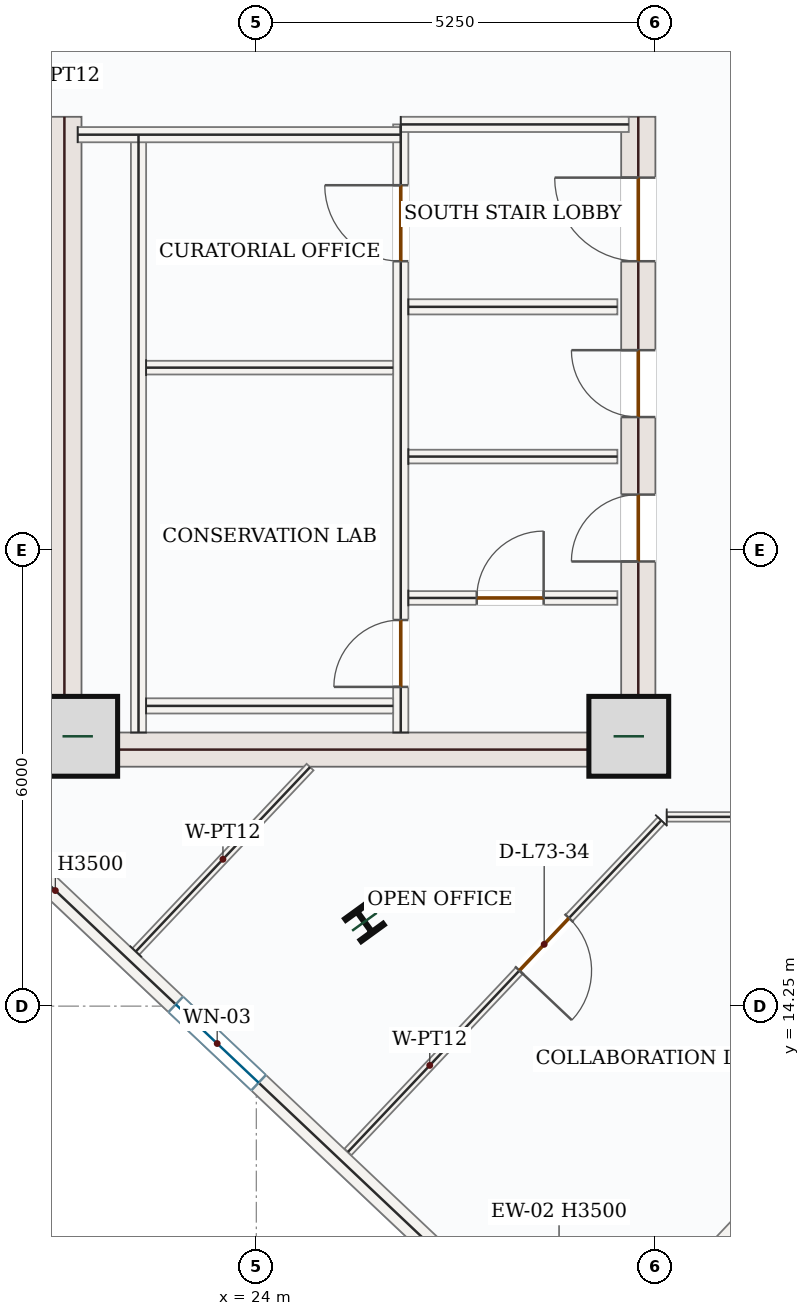
"""IFC4 building model, lengths in metres.
Left out: names, types, materials, properties, quantities, classifications, styles, units other than length and angle.
Written with IfcOpenShell. Run it as: python <this file> out.ifc"""

import sys

from ifc_helpers import new_model, si_unit, direction, frame, frame_2d, origin, origin_2d, place, context, subcontext, project, spatial, rectangle, i_section, extrude, source, transform, mapped, element, fill, save


model = new_model("IFC4")
c1 = context("Model", 3, precision=1e-05, world=origin(), true_north=direction((0.0, 1.0)))
c2 = subcontext(c1, "Body", "Model", "MODEL_VIEW")
j1 = project(units=[si_unit("LENGTHUNIT", "METRE"), si_unit("PLANEANGLEUNIT", "RADIAN")], contexts=[c1])
p1 = place(None, origin())
s1 = spatial("IfcSite", under=j1, at=p1, CompositionType="ELEMENT")
p2 = place(p1, origin())
s2 = spatial("IfcBuilding", under=s1, at=p2, CompositionType="ELEMENT")
p3 = place(p2, frame((0.0, 0.0, 302.85)))
s3 = spatial("IfcBuildingStorey", under=s2, at=p3, CompositionType="ELEMENT", Elevation=302.85)
m1 = source(origin(), c2, "Body", "SweptSolid", [
    extrude(rectangle(XDim=8.55, YDim=0.45, at=frame_2d((4.275, 0.0))), origin(), (0.0, 0.0, 1.0), 3.5),
])
p4 = place(p3, frame((21.475, 17.4, 0.0), z_axis=(0.0, 0.0, 1.0), x_axis=(0.0, 1.0, 0.0)))
e1 = element("IfcWall", 1, at=p4, inside=s3, PredefinedType="SHEAR", context=c2, shape_type="MappedRepresentation", body=[
    mapped(m1, transform((0.0, 0.0, 0.0), x_axis=(1.0, 0.0, 0.0), y_axis=(0.0, 1.0, 0.0), z_axis=(0.0, 0.0, 1.0), scale=1.0)),
])
p5 = place(p3, frame((29.025, 17.4, 0.0), z_axis=(0.0, 0.0, 1.0), x_axis=(0.0, 1.0, 0.0)))
e2 = element("IfcWall", 2, at=p5, inside=s3, PredefinedType="SHEAR", context=c2, shape_type="SweptSolid", body=[
    extrude(rectangle(XDim=8.55, YDim=0.45, at=frame_2d((4.275, 0.0))), origin(), (0.0, 0.0, 1.0), 3.5),
])
p6 = place(p5, frame((6.65, 0.0, 0.0)))
e3 = element("IfcOpeningElement", 3, at=p6, cuts=e2, PredefinedType="OPENING", context=c2, shape_type="SweptSolid", body=[
    extrude(rectangle(XDim=1.1, YDim=2.2, at=frame_2d((0.55, 1.1))), frame((0.0, 0.235, 0.0), z_axis=(0.0, -1.0, 0.0), x_axis=(1.0, 0.0, 0.0)), (0.0, 0.0, 1.0), 0.47),
])
p7 = place(p5, frame((2.7, 0.0, 0.0)))
e4 = element("IfcOpeningElement", 4, at=p7, cuts=e2, PredefinedType="OPENING", context=c2, shape_type="SweptSolid", body=[
    extrude(rectangle(XDim=0.88, YDim=2.1, at=frame_2d((0.44, 1.05))), frame((0.0, 0.235, 0.0), z_axis=(0.0, -1.0, 0.0), x_axis=(1.0, 0.0, 0.0)), (0.0, 0.0, 1.0), 0.47),
])
p8 = place(p5, frame((4.6, 0.0, 0.0)))
e5 = element("IfcOpeningElement", 5, at=p8, cuts=e2, PredefinedType="OPENING", context=c2, shape_type="SweptSolid", body=[
    extrude(rectangle(XDim=0.88, YDim=2.1, at=frame_2d((0.44, 1.05))), frame((0.0, 0.235, 0.0), z_axis=(0.0, -1.0, 0.0), x_axis=(1.0, 0.0, 0.0)), (0.0, 0.0, 1.0), 0.47),
])
m2 = source(origin(), c2, "Body", "SweptSolid", [
    extrude(rectangle(XDim=7.1, YDim=0.45, at=frame_2d((3.55, 0.0))), origin(), (0.0, 0.0, 1.0), 3.5),
])
p9 = place(p3, frame((21.7, 17.625, 0.0), z_axis=(0.0, 0.0, 1.0), x_axis=(1.0, 0.0, 0.0)))
e6 = element("IfcWall", 6, at=p9, inside=s3, PredefinedType="SHEAR", context=c2, shape_type="MappedRepresentation", body=[
    mapped(m2, transform((0.0, 0.0, 0.0), x_axis=(1.0, 0.0, 0.0), y_axis=(0.0, 1.0, 0.0), z_axis=(0.0, 0.0, 1.0), scale=1.0)),
])
m3 = source(origin(), c2, "Body", "SweptSolid", [
    extrude(rectangle(XDim=1.05, YDim=1.05, at=origin_2d()), origin(), (0.0, 0.0, 1.0), 3.75),
])
for number, where, z_axis, x_axis in (
    (7, (21.65, 17.8, 0.0), (0.0, 0.0, 1.0), (1.0, 0.0, 0.0)),
    (8, (28.9, 17.8, 0.0), (0.0, 0.0, 1.0), (1.0, 0.0, 0.0)),
):
    element("IfcColumn", number, at=place(p3, frame(where, z_axis=z_axis, x_axis=x_axis)), inside=s3, PredefinedType="COLUMN", context=c2, shape_type="MappedRepresentation", body=[
        mapped(m3, transform((0.0, 0.0, 0.0), x_axis=(1.0, 0.0, 0.0), y_axis=(0.0, 1.0, 0.0), z_axis=(0.0, 0.0, 1.0), scale=1.0)),
    ])
m4 = source(origin(), c2, "Body", "SweptSolid", [
    extrude(i_section(OverallWidth=0.374, OverallDepth=0.372, WebThickness=0.016, FlangeThickness=0.026, FilletRadius=0.018, at=origin_2d()), origin(), (0.0, 0.0, 1.0), 3.75),
])
p10 = place(p3, frame((25.422, 15.359, 0.0), z_axis=(0.0, 0.0, 1.0), x_axis=(0.809016994375, 0.587785252292, 0.0)))
e9 = element("IfcColumn", 9, at=p10, inside=s3, PredefinedType="COLUMN", context=c2, shape_type="MappedRepresentation", body=[
    mapped(m4, transform((0.0, 0.0, 0.0), x_axis=(1.0, 0.0, 0.0), y_axis=(0.0, 1.0, 0.0), z_axis=(0.0, 0.0, 1.0), scale=1.0)),
])
p11 = place(p3, frame((33.577, 14.74, 0.0), z_axis=(0.0, 0.0, 1.0), x_axis=(-0.686888766374, -0.72676256276, 0.0)))
e10 = element("IfcWall", 10, at=p11, inside=s3, PredefinedType="SOLIDWALL", context=c2, shape_type="SweptSolid", body=[
    extrude(rectangle(XDim=5.945, YDim=0.28, at=frame_2d((2.973, 0.0))), origin(), (0.0, 0.0, 1.0), 3.5),
])
p12 = place(p11, frame((2.223, 0.0, 0.85)))
e11 = element("IfcOpeningElement", 11, at=p12, cuts=e10, PredefinedType="OPENING", context=c2, shape_type="SweptSolid", body=[
    extrude(rectangle(XDim=1.5, YDim=1.5, at=frame_2d((0.75, 0.75))), frame((0.0, 0.15, 0.0), z_axis=(0.0, -1.0, 0.0), x_axis=(1.0, 0.0, 0.0)), (0.0, 0.0, 1.0), 0.3),
])
p13 = place(p3, frame((27.09, 10.351, 0.0), z_axis=(0.0, 0.0, 1.0), x_axis=(-0.726772856404, 0.686877875022, 0.0)))
e12 = element("IfcWall", 12, at=p13, inside=s3, PredefinedType="SOLIDWALL", context=c2, shape_type="SweptSolid", body=[
    extrude(rectangle(XDim=9.92, YDim=0.28, at=frame_2d((4.96, 0.0))), origin(), (0.0, 0.0, 1.0), 3.5),
])
p14 = place(p13, frame((4.21, 0.0, 0.85)))
e13 = element("IfcOpeningElement", 13, at=p14, cuts=e12, PredefinedType="OPENING", context=c2, shape_type="SweptSolid", body=[
    extrude(rectangle(XDim=1.5, YDim=1.5, at=frame_2d((0.75, 0.75))), frame((0.0, 0.15, 0.0), z_axis=(0.0, -1.0, 0.0), x_axis=(1.0, 0.0, 0.0)), (0.0, 0.0, 1.0), 0.3),
])
m5 = source(origin(), c2, "Body", "SweptSolid", [
    extrude(rectangle(XDim=7.87, YDim=0.2, at=frame_2d((3.935, 0.0))), origin(), (0.0, 0.0, 1.0), 3.5),
])
p15 = place(p3, frame((22.45, 17.85, 0.0), z_axis=(0.0, 0.0, 1.0), x_axis=(0.0, 1.0, 0.0)))
e14 = element("IfcWall", 14, at=p15, inside=s3, PredefinedType="SOLIDWALL", context=c2, shape_type="MappedRepresentation", body=[
    mapped(m5, transform((0.0, 0.0, 0.0), x_axis=(1.0, 0.0, 0.0), y_axis=(0.0, 1.0, 0.0), z_axis=(0.0, 0.0, 1.0), scale=1.0)),
])
p16 = place(p3, frame((25.9, 17.85, 0.0), z_axis=(0.0, 0.0, 1.0), x_axis=(0.0, 1.0, 0.0)))
e15 = element("IfcWall", 15, at=p16, inside=s3, PredefinedType="SOLIDWALL", context=c2, shape_type="SweptSolid", body=[
    extrude(rectangle(XDim=8.0, YDim=0.2, at=frame_2d((4.0, 0.0))), origin(), (0.0, 0.0, 1.0), 3.5),
])
p17 = place(p16, frame((6.2, 0.0, 0.0)))
e16 = element("IfcOpeningElement", 16, at=p17, cuts=e15, PredefinedType="OPENING", context=c2, shape_type="SweptSolid", body=[
    extrude(rectangle(XDim=1.0, YDim=2.15, at=frame_2d((0.5, 1.075))), frame((0.0, 0.11, 0.0), z_axis=(0.0, -1.0, 0.0), x_axis=(1.0, 0.0, 0.0)), (0.0, 0.0, 1.0), 0.22),
])
p18 = place(p16, frame((0.6, 0.0, 0.0)))
e17 = element("IfcOpeningElement", 17, at=p18, cuts=e15, PredefinedType="OPENING", context=c2, shape_type="SweptSolid", body=[
    extrude(rectangle(XDim=0.88, YDim=2.1, at=frame_2d((0.44, 1.05))), frame((0.0, 0.11, 0.0), z_axis=(0.0, -1.0, 0.0), x_axis=(1.0, 0.0, 0.0)), (0.0, 0.0, 1.0), 0.22),
])
m6 = source(origin(), c2, "Body", "SweptSolid", [
    extrude(rectangle(XDim=4.25, YDim=0.2, at=frame_2d((2.125, 0.0))), origin(), (0.0, 0.0, 1.0), 3.5),
])
p19 = place(p3, frame((21.65, 25.715, 0.0), z_axis=(0.0, 0.0, 1.0), x_axis=(1.0, 0.0, 0.0)))
e18 = element("IfcWall", 18, at=p19, inside=s3, PredefinedType="SOLIDWALL", context=c2, shape_type="MappedRepresentation", body=[
    mapped(m6, transform((0.0, 0.0, 0.0), x_axis=(1.0, 0.0, 0.0), y_axis=(0.0, 1.0, 0.0), z_axis=(0.0, 0.0, 1.0), scale=1.0)),
])
m7 = source(origin(), c2, "Body", "SweptSolid", [
    extrude(rectangle(XDim=3.0, YDim=0.2, at=frame_2d((1.5, 0.0))), origin(), (0.0, 0.0, 1.0), 3.5),
])
p20 = place(p3, frame((25.9, 25.85, 0.0), z_axis=(0.0, 0.0, 1.0), x_axis=(1.0, 0.0, 0.0)))
e19 = element("IfcWall", 19, at=p20, inside=s3, PredefinedType="SOLIDWALL", context=c2, shape_type="MappedRepresentation", body=[
    mapped(m7, transform((0.0, 0.0, 0.0), x_axis=(1.0, 0.0, 0.0), y_axis=(0.0, 1.0, 0.0), z_axis=(0.0, 0.0, 1.0), scale=1.0)),
])
m8 = source(origin(), c2, "Body", "SweptSolid", [
    extrude(rectangle(XDim=3.25, YDim=0.2, at=frame_2d((1.625, 0.0))), origin(), (0.0, 0.0, 1.0), 3.5),
])
p21 = place(p3, frame((22.55, 18.2, 0.0), z_axis=(0.0, 0.0, 1.0), x_axis=(1.0, 0.0, 0.0)))
e20 = element("IfcWall", 20, at=p21, inside=s3, PredefinedType="SOLIDWALL", context=c2, shape_type="MappedRepresentation", body=[
    mapped(m8, transform((0.0, 0.0, 0.0), x_axis=(1.0, 0.0, 0.0), y_axis=(0.0, 1.0, 0.0), z_axis=(0.0, 0.0, 1.0), scale=1.0)),
])
m9 = source(origin(), c2, "Body", "SweptSolid", [
    extrude(rectangle(XDim=3.25, YDim=0.18, at=frame_2d((1.625, 0.0))), origin(), (0.0, 0.0, 1.0), 3.5),
])
p22 = place(p3, frame((22.55, 22.65, 0.0), z_axis=(0.0, 0.0, 1.0), x_axis=(1.0, 0.0, 0.0)))
e21 = element("IfcWall", 21, at=p22, inside=s3, PredefinedType="PARTITIONING", context=c2, shape_type="MappedRepresentation", body=[
    mapped(m9, transform((0.0, 0.0, 0.0), x_axis=(1.0, 0.0, 0.0), y_axis=(0.0, 1.0, 0.0), z_axis=(0.0, 0.0, 1.0), scale=1.0)),
])
m10 = source(origin(), c2, "Body", "SweptSolid", [
    extrude(rectangle(XDim=2.75, YDim=0.2, at=frame_2d((1.375, 0.0))), origin(), (0.0, 0.0, 1.0), 3.5),
])
p23 = place(p3, frame((26.0, 23.45, 0.0), z_axis=(0.0, 0.0, 1.0), x_axis=(1.0, 0.0, 0.0)))
e22 = element("IfcWall", 22, at=p23, inside=s3, PredefinedType="SOLIDWALL", context=c2, shape_type="MappedRepresentation", body=[
    mapped(m10, transform((0.0, 0.0, 0.0), x_axis=(1.0, 0.0, 0.0), y_axis=(0.0, 1.0, 0.0), z_axis=(0.0, 0.0, 1.0), scale=1.0)),
])
p24 = place(p3, frame((26.0, 19.62, 0.0), z_axis=(0.0, 0.0, 1.0), x_axis=(1.0, 0.0, 0.0)))
e23 = element("IfcWall", 23, at=p24, inside=s3, PredefinedType="PARTITIONING", context=c2, shape_type="SweptSolid", body=[
    extrude(rectangle(XDim=2.75, YDim=0.18, at=frame_2d((1.375, 0.0))), origin(), (0.0, 0.0, 1.0), 3.5),
])
p25 = place(p24, frame((0.9, 0.0, 0.0)))
e24 = element("IfcOpeningElement", 24, at=p25, cuts=e23, PredefinedType="OPENING", context=c2, shape_type="SweptSolid", body=[
    extrude(rectangle(XDim=0.88, YDim=2.1, at=frame_2d((0.44, 1.05))), frame((0.0, 0.1, 0.0), z_axis=(0.0, -1.0, 0.0), x_axis=(1.0, 0.0, 0.0)), (0.0, 0.0, 1.0), 0.2),
])
m11 = source(origin(), c2, "Body", "SweptSolid", [
    extrude(rectangle(XDim=2.75, YDim=0.18, at=frame_2d((1.375, 0.0))), origin(), (0.0, 0.0, 1.0), 3.5),
])
p26 = place(p3, frame((26.0, 21.48, 0.0), z_axis=(0.0, 0.0, 1.0), x_axis=(1.0, 0.0, 0.0)))
e25 = element("IfcWall", 25, at=p26, inside=s3, PredefinedType="PARTITIONING", context=c2, shape_type="MappedRepresentation", body=[
    mapped(m11, transform((0.0, 0.0, 0.0), x_axis=(1.0, 0.0, 0.0), y_axis=(0.0, 1.0, 0.0), z_axis=(0.0, 0.0, 1.0), scale=1.0)),
])
m12 = source(origin(), c2, "Body", "SweptSolid", [
    extrude(rectangle(XDim=3.337, YDim=0.125, at=frame_2d((1.669, 0.0))), origin(), (0.0, 0.0, 1.0), 3.5),
])
p27 = place(p3, frame((22.415, 14.969, 0.0), z_axis=(0.0, 0.0, 1.0), x_axis=(0.686891986515, 0.726759519278, 0.0)))
e26 = element("IfcWall", 26, at=p27, inside=s3, PredefinedType="PARTITIONING", context=c2, shape_type="MappedRepresentation", body=[
    mapped(m12, transform((0.0, 0.0, 0.0), x_axis=(1.0, 0.0, 0.0), y_axis=(0.0, 1.0, 0.0), z_axis=(0.0, 0.0, 1.0), scale=1.0)),
])
p28 = place(p3, frame((29.328, 16.694, 0.0), z_axis=(0.0, 0.0, 1.0), x_axis=(-0.686871949206, -0.726778456886, 0.0)))
e27 = element("IfcWall", 27, at=p28, inside=s3, PredefinedType="PARTITIONING", context=c2, shape_type="SweptSolid", body=[
    extrude(rectangle(XDim=6.001, YDim=0.125, at=frame_2d((3.001, 0.0))), origin(), (0.0, 0.0, 1.0), 3.5),
])
p29 = place(p28, frame((1.768, 0.0, 0.0)))
e28 = element("IfcOpeningElement", 28, at=p29, cuts=e27, PredefinedType="OPENING", context=c2, shape_type="SweptSolid", body=[
    extrude(rectangle(XDim=0.95, YDim=2.15, at=frame_2d((0.475, 1.075))), frame((0.0, 0.073, 0.0), z_axis=(0.0, -1.0, 0.0), x_axis=(1.0, 0.0, 0.0)), (0.0, 0.0, 1.0), 0.145),
])
p30 = place(p3, frame((29.399, 16.74, 0.0), z_axis=(0.0, 0.0, 1.0), x_axis=(1.0, 0.0, 0.0)))
e29 = element("IfcWall", 29, at=p30, inside=s3, PredefinedType="PARTITIONING", context=c2, shape_type="SweptSolid", body=[
    extrude(rectangle(XDim=6.881, YDim=0.125, at=frame_2d((3.44, 0.0))), origin(), (0.0, 0.0, 1.0), 3.5),
])
p31 = place(p30, frame((4.626, 0.0, 0.0)))
e30 = element("IfcOpeningElement", 30, at=p31, cuts=e29, PredefinedType="OPENING", context=c2, shape_type="SweptSolid", body=[
    extrude(rectangle(XDim=0.95, YDim=2.15, at=frame_2d((0.475, 1.075))), frame((0.0, 0.073, 0.0), z_axis=(0.0, -1.0, 0.0), x_axis=(1.0, 0.0, 0.0)), (0.0, 0.0, 1.0), 0.145),
])
m13 = source(origin(), c2, "Body", "SweptSolid", [
    extrude(rectangle(XDim=1.5, YDim=1.5, at=frame_2d((0.75, 0.75))), frame((0.0, 0.03, 0.0), z_axis=(0.0, -1.0, 0.0), x_axis=(1.0, 0.0, 0.0)), (0.0, 0.0, 1.0), 0.06),
])
p32 = place(p14, origin())
e31 = element("IfcWindow", 31, at=p32, inside=s3, PartitioningType="SINGLE_PANEL", PredefinedType="WINDOW", context=c2, shape_type="MappedRepresentation", body=[
    mapped(m13, transform((0.0, 0.0, 0.0), x_axis=(1.0, 0.0, 0.0), y_axis=(0.0, 1.0, 0.0), z_axis=(0.0, 0.0, 1.0), scale=1.0)),
])
fill(e13, e31)
m14 = source(origin(), c2, "Body", "SweptSolid", [
    extrude(rectangle(XDim=1.0, YDim=2.15, at=frame_2d((0.5, 1.075))), frame((0.0, 0.025, 0.0), z_axis=(0.0, -1.0, 0.0), x_axis=(1.0, 0.0, 0.0)), (0.0, 0.0, 1.0), 0.05),
])
p33 = place(p17, origin())
e32 = element("IfcDoor", 32, at=p33, inside=s3, OperationType="SINGLE_SWING_RIGHT", PredefinedType="DOOR", context=c2, shape_type="MappedRepresentation", body=[
    mapped(m14, transform((0.0, 0.0, 0.0), x_axis=(1.0, 0.0, 0.0), y_axis=(0.0, 1.0, 0.0), z_axis=(0.0, 0.0, 1.0), scale=1.0)),
])
fill(e16, e32)
m15 = source(origin(), c2, "Body", "SweptSolid", [
    extrude(rectangle(XDim=0.88, YDim=2.1, at=frame_2d((0.44, 1.05))), frame((0.0, 0.025, 0.0), z_axis=(0.0, -1.0, 0.0), x_axis=(1.0, 0.0, 0.0)), (0.0, 0.0, 1.0), 0.05),
])
p34 = place(p18, origin())
e33 = element("IfcDoor", 33, at=p34, inside=s3, OperationType="SINGLE_SWING_LEFT", PredefinedType="DOOR", context=c2, shape_type="MappedRepresentation", body=[
    mapped(m15, transform((0.0, 0.0, 0.0), x_axis=(1.0, 0.0, 0.0), y_axis=(0.0, 1.0, 0.0), z_axis=(0.0, 0.0, 1.0), scale=1.0)),
])
fill(e17, e33)
m16 = source(origin(), c2, "Body", "SweptSolid", [
    extrude(rectangle(XDim=1.1, YDim=2.2, at=frame_2d((0.55, 1.1))), frame((0.0, 0.025, 0.0), z_axis=(0.0, -1.0, 0.0), x_axis=(1.0, 0.0, 0.0)), (0.0, 0.0, 1.0), 0.05),
])
p35 = place(p6, origin())
e34 = element("IfcDoor", 34, at=p35, inside=s3, OperationType="SINGLE_SWING_RIGHT", PredefinedType="DOOR", context=c2, shape_type="MappedRepresentation", body=[
    mapped(m16, transform((0.0, 0.0, 0.0), x_axis=(1.0, 0.0, 0.0), y_axis=(0.0, 1.0, 0.0), z_axis=(0.0, 0.0, 1.0), scale=1.0)),
])
fill(e3, e34)
p36 = place(p25, origin())
e35 = element("IfcDoor", 35, at=p36, inside=s3, OperationType="SINGLE_SWING_RIGHT", PredefinedType="DOOR", context=c2, shape_type="MappedRepresentation", body=[
    mapped(m15, transform((0.0, 0.0, 0.0), x_axis=(1.0, 0.0, 0.0), y_axis=(0.0, 1.0, 0.0), z_axis=(0.0, 0.0, 1.0), scale=1.0)),
])
fill(e24, e35)
p37 = place(p7, origin())
e36 = element("IfcDoor", 36, at=p37, inside=s3, OperationType="SINGLE_SWING_LEFT", PredefinedType="DOOR", context=c2, shape_type="MappedRepresentation", body=[
    mapped(m15, transform((0.0, 0.0, 0.0), x_axis=(1.0, 0.0, 0.0), y_axis=(0.0, 1.0, 0.0), z_axis=(0.0, 0.0, 1.0), scale=1.0)),
])
fill(e4, e36)
p38 = place(p8, origin())
e37 = element("IfcDoor", 37, at=p38, inside=s3, OperationType="SINGLE_SWING_RIGHT", PredefinedType="DOOR", context=c2, shape_type="MappedRepresentation", body=[
    mapped(m15, transform((0.0, 0.0, 0.0), x_axis=(1.0, 0.0, 0.0), y_axis=(0.0, 1.0, 0.0), z_axis=(0.0, 0.0, 1.0), scale=1.0)),
])
fill(e5, e37)
m17 = source(origin(), c2, "Body", "SweptSolid", [
    extrude(rectangle(XDim=0.95, YDim=2.15, at=frame_2d((0.475, 1.075))), frame((0.0, 0.025, 0.0), z_axis=(0.0, -1.0, 0.0), x_axis=(1.0, 0.0, 0.0)), (0.0, 0.0, 1.0), 0.05),
])
p39 = place(p29, origin())
e38 = element("IfcDoor", 38, at=p39, inside=s3, OperationType="SINGLE_SWING_RIGHT", PredefinedType="DOOR", context=c2, shape_type="MappedRepresentation", body=[
    mapped(m17, transform((0.0, 0.0, 0.0), x_axis=(1.0, 0.0, 0.0), y_axis=(0.0, 1.0, 0.0), z_axis=(0.0, 0.0, 1.0), scale=1.0)),
])
fill(e28, e38)
save(model, sys.argv[1])
